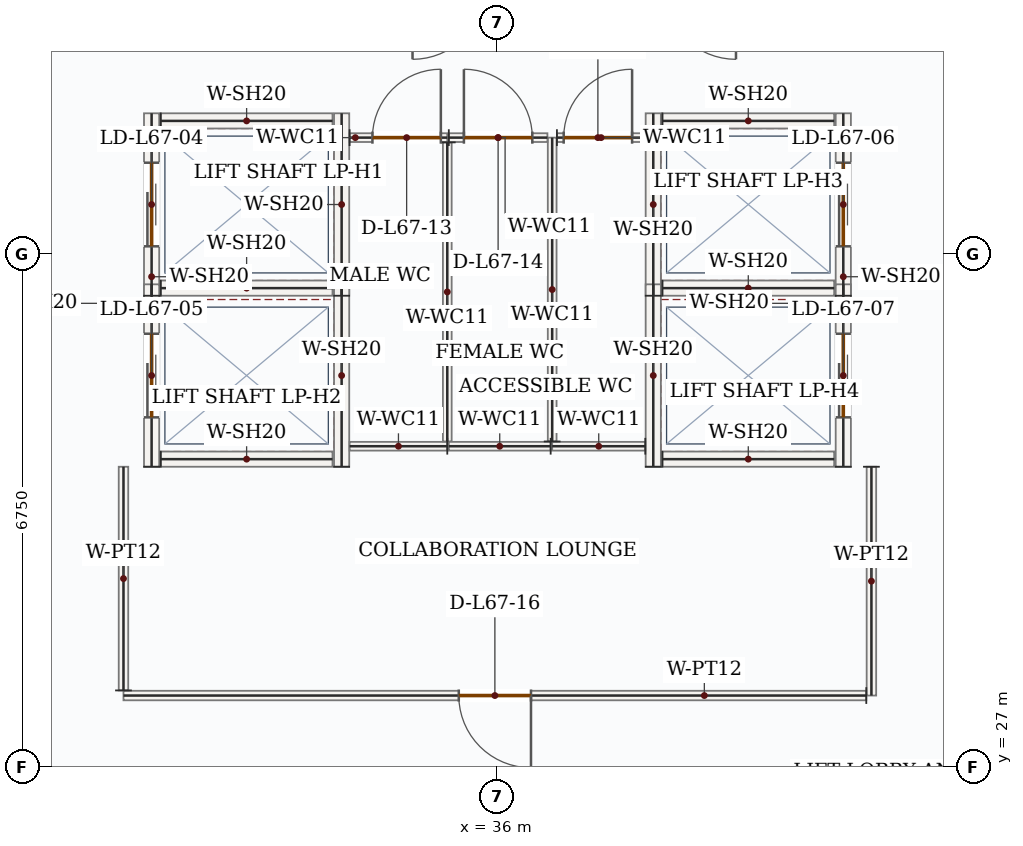
"""IFC4 building model, lengths in metres.
Left out: names, types, materials, properties, quantities, classifications, styles, units other than length and angle.
Written with IfcOpenShell. Run it as: python <this file> out.ifc"""

import sys

from ifc_helpers import new_model, si_unit, direction, frame, frame_2d, origin, place, context, subcontext, project, spatial, rectangle, extrude, source, transform, mapped, element, fill, save


model = new_model("IFC4")
c1 = context("Model", 3, precision=1e-05, world=origin(), true_north=direction((0.0, 1.0)))
c2 = subcontext(c1, "Body", "Model", "MODEL_VIEW")
j1 = project(units=[si_unit("LENGTHUNIT", "METRE"), si_unit("PLANEANGLEUNIT", "RADIAN")], contexts=[c1])
p1 = place(None, origin())
s1 = spatial("IfcSite", under=j1, at=p1, CompositionType="ELEMENT")
p2 = place(p1, origin())
s2 = spatial("IfcBuilding", under=s1, at=p2, CompositionType="ELEMENT")
p3 = place(p2, frame((0.0, 0.0, 280.35)))
s3 = spatial("IfcBuildingStorey", under=s2, at=p3, CompositionType="ELEMENT", Elevation=280.35)
p4 = place(p3, frame((31.45, 33.2, 0.0), z_axis=(0.0, 0.0, 1.0), x_axis=(0.0, 1.0, 0.0)))
e1 = element("IfcWall", 1, at=p4, inside=s3, PredefinedType="SOLIDWALL", context=c2, shape_type="SweptSolid", body=[
    extrude(rectangle(XDim=2.4, YDim=0.2, at=frame_2d((1.2, 0.0))), origin(), (0.0, 0.0, 1.0), 3.5),
])
p5 = place(p4, frame((0.65, 0.0, 0.0)))
e2 = element("IfcOpeningElement", 2, at=p5, cuts=e1, PredefinedType="OPENING", context=c2, shape_type="SweptSolid", body=[
    extrude(rectangle(XDim=1.1, YDim=2.15, at=frame_2d((0.55, 1.075))), frame((0.0, 0.11, 0.0), z_axis=(0.0, -1.0, 0.0), x_axis=(1.0, 0.0, 0.0)), (0.0, 0.0, 1.0), 0.22),
])
m1 = source(origin(), c2, "Body", "SweptSolid", [
    extrude(rectangle(XDim=2.4, YDim=0.2, at=frame_2d((1.2, 0.0))), origin(), (0.0, 0.0, 1.0), 3.5),
])
p6 = place(p3, frame((33.95, 33.2, 0.0), z_axis=(0.0, 0.0, 1.0), x_axis=(0.0, 1.0, 0.0)))
e3 = element("IfcWall", 3, at=p6, inside=s3, PredefinedType="SOLIDWALL", context=c2, shape_type="MappedRepresentation", body=[
    mapped(m1, transform((0.0, 0.0, 0.0), x_axis=(1.0, 0.0, 0.0), y_axis=(0.0, 1.0, 0.0), z_axis=(0.0, 0.0, 1.0), scale=1.0)),
])
m2 = source(origin(), c2, "Body", "SweptSolid", [
    extrude(rectangle(XDim=2.26, YDim=0.2, at=frame_2d((1.13, 0.0))), origin(), (0.0, 0.0, 1.0), 3.5),
])
for number, where, z_axis, x_axis in (
    (4, (31.57, 33.3, 0.0), (0.0, 0.0, 1.0), (1.0, 0.0, 0.0)),
    (5, (31.57, 35.5, 0.0), (0.0, 0.0, 1.0), (1.0, 0.0, 0.0)),
):
    element("IfcWall", number, at=place(p3, frame(where, z_axis=z_axis, x_axis=x_axis)), inside=s3, PredefinedType="SOLIDWALL", context=c2, shape_type="MappedRepresentation", body=[
        mapped(m2, transform((0.0, 0.0, 0.0), x_axis=(1.0, 0.0, 0.0), y_axis=(0.0, 1.0, 0.0), z_axis=(0.0, 0.0, 1.0), scale=1.0)),
    ])
p7 = place(p3, frame((31.45, 30.95, 0.0), z_axis=(0.0, 0.0, 1.0), x_axis=(0.0, 1.0, 0.0)))
e6 = element("IfcWall", 6, at=p7, inside=s3, PredefinedType="SOLIDWALL", context=c2, shape_type="SweptSolid", body=[
    extrude(rectangle(XDim=2.4, YDim=0.2, at=frame_2d((1.2, 0.0))), origin(), (0.0, 0.0, 1.0), 3.5),
])
p8 = place(p7, frame((0.65, 0.0, 0.0)))
e7 = element("IfcOpeningElement", 7, at=p8, cuts=e6, PredefinedType="OPENING", context=c2, shape_type="SweptSolid", body=[
    extrude(rectangle(XDim=1.1, YDim=2.15, at=frame_2d((0.55, 1.075))), frame((0.0, 0.11, 0.0), z_axis=(0.0, -1.0, 0.0), x_axis=(1.0, 0.0, 0.0)), (0.0, 0.0, 1.0), 0.22),
])
p9 = place(p3, frame((33.95, 30.95, 0.0), z_axis=(0.0, 0.0, 1.0), x_axis=(0.0, 1.0, 0.0)))
e8 = element("IfcWall", 8, at=p9, inside=s3, PredefinedType="SOLIDWALL", context=c2, shape_type="MappedRepresentation", body=[
    mapped(m1, transform((0.0, 0.0, 0.0), x_axis=(1.0, 0.0, 0.0), y_axis=(0.0, 1.0, 0.0), z_axis=(0.0, 0.0, 1.0), scale=1.0)),
])
p10 = place(p3, frame((31.57, 31.05, 0.0), z_axis=(0.0, 0.0, 1.0), x_axis=(1.0, 0.0, 0.0)))
e9 = element("IfcWall", 9, at=p10, inside=s3, PredefinedType="SOLIDWALL", context=c2, shape_type="MappedRepresentation", body=[
    mapped(m2, transform((0.0, 0.0, 0.0), x_axis=(1.0, 0.0, 0.0), y_axis=(0.0, 1.0, 0.0), z_axis=(0.0, 0.0, 1.0), scale=1.0)),
])
p11 = place(p3, frame((38.05, 33.2, 0.0), z_axis=(0.0, 0.0, 1.0), x_axis=(0.0, 1.0, 0.0)))
e10 = element("IfcWall", 10, at=p11, inside=s3, PredefinedType="SOLIDWALL", context=c2, shape_type="MappedRepresentation", body=[
    mapped(m1, transform((0.0, 0.0, 0.0), x_axis=(1.0, 0.0, 0.0), y_axis=(0.0, 1.0, 0.0), z_axis=(0.0, 0.0, 1.0), scale=1.0)),
])
p12 = place(p3, frame((40.55, 33.2, 0.0), z_axis=(0.0, 0.0, 1.0), x_axis=(0.0, 1.0, 0.0)))
e11 = element("IfcWall", 11, at=p12, inside=s3, PredefinedType="SOLIDWALL", context=c2, shape_type="SweptSolid", body=[
    extrude(rectangle(XDim=2.4, YDim=0.2, at=frame_2d((1.2, 0.0))), origin(), (0.0, 0.0, 1.0), 3.5),
])
p13 = place(p12, frame((0.65, 0.0, 0.0)))
e12 = element("IfcOpeningElement", 12, at=p13, cuts=e11, PredefinedType="OPENING", context=c2, shape_type="SweptSolid", body=[
    extrude(rectangle(XDim=1.1, YDim=2.15, at=frame_2d((0.55, 1.075))), frame((0.0, 0.11, 0.0), z_axis=(0.0, -1.0, 0.0), x_axis=(1.0, 0.0, 0.0)), (0.0, 0.0, 1.0), 0.22),
])
for number, where, z_axis, x_axis in (
    (13, (38.17, 33.3, 0.0), (0.0, 0.0, 1.0), (1.0, 0.0, 0.0)),
    (14, (38.17, 35.5, 0.0), (0.0, 0.0, 1.0), (1.0, 0.0, 0.0)),
):
    element("IfcWall", number, at=place(p3, frame(where, z_axis=z_axis, x_axis=x_axis)), inside=s3, PredefinedType="SOLIDWALL", context=c2, shape_type="MappedRepresentation", body=[
        mapped(m2, transform((0.0, 0.0, 0.0), x_axis=(1.0, 0.0, 0.0), y_axis=(0.0, 1.0, 0.0), z_axis=(0.0, 0.0, 1.0), scale=1.0)),
    ])
p14 = place(p3, frame((38.05, 30.95, 0.0), z_axis=(0.0, 0.0, 1.0), x_axis=(0.0, 1.0, 0.0)))
e15 = element("IfcWall", 15, at=p14, inside=s3, PredefinedType="SOLIDWALL", context=c2, shape_type="MappedRepresentation", body=[
    mapped(m1, transform((0.0, 0.0, 0.0), x_axis=(1.0, 0.0, 0.0), y_axis=(0.0, 1.0, 0.0), z_axis=(0.0, 0.0, 1.0), scale=1.0)),
])
p15 = place(p3, frame((40.55, 30.95, 0.0), z_axis=(0.0, 0.0, 1.0), x_axis=(0.0, 1.0, 0.0)))
e16 = element("IfcWall", 16, at=p15, inside=s3, PredefinedType="SOLIDWALL", context=c2, shape_type="SweptSolid", body=[
    extrude(rectangle(XDim=2.4, YDim=0.2, at=frame_2d((1.2, 0.0))), origin(), (0.0, 0.0, 1.0), 3.5),
])
p16 = place(p15, frame((0.65, 0.0, 0.0)))
e17 = element("IfcOpeningElement", 17, at=p16, cuts=e16, PredefinedType="OPENING", context=c2, shape_type="SweptSolid", body=[
    extrude(rectangle(XDim=1.1, YDim=2.15, at=frame_2d((0.55, 1.075))), frame((0.0, 0.11, 0.0), z_axis=(0.0, -1.0, 0.0), x_axis=(1.0, 0.0, 0.0)), (0.0, 0.0, 1.0), 0.22),
])
p17 = place(p3, frame((38.17, 31.05, 0.0), z_axis=(0.0, 0.0, 1.0), x_axis=(1.0, 0.0, 0.0)))
e18 = element("IfcWall", 18, at=p17, inside=s3, PredefinedType="SOLIDWALL", context=c2, shape_type="MappedRepresentation", body=[
    mapped(m2, transform((0.0, 0.0, 0.0), x_axis=(1.0, 0.0, 0.0), y_axis=(0.0, 1.0, 0.0), z_axis=(0.0, 0.0, 1.0), scale=1.0)),
])
m3 = source(origin(), c2, "Body", "SweptSolid", [
    extrude(rectangle(XDim=1.225, YDim=0.115, at=frame_2d((0.613, 0.0))), origin(), (0.0, 0.0, 1.0), 3.5),
])
p18 = place(p3, frame((37.945, 31.22, 0.0), z_axis=(0.0, 0.0, 1.0), x_axis=(-1.0, 0.0, 0.0)))
e19 = element("IfcWall", 19, at=p18, inside=s3, PredefinedType="PARTITIONING", context=c2, shape_type="MappedRepresentation", body=[
    mapped(m3, transform((0.0, 0.0, 0.0), x_axis=(1.0, 0.0, 0.0), y_axis=(0.0, 1.0, 0.0), z_axis=(0.0, 0.0, 1.0), scale=1.0)),
])
m4 = source(origin(), c2, "Body", "SweptSolid", [
    extrude(rectangle(XDim=3.998, YDim=0.115, at=frame_2d((1.999, 0.0))), origin(), (0.0, 0.0, 1.0), 3.5),
])
p19 = place(p3, frame((36.72, 31.282, 0.0), z_axis=(0.0, 0.0, 1.0), x_axis=(0.0, 1.0, 0.0)))
e20 = element("IfcWall", 20, at=p19, inside=s3, PredefinedType="PARTITIONING", context=c2, shape_type="MappedRepresentation", body=[
    mapped(m4, transform((0.0, 0.0, 0.0), x_axis=(1.0, 0.0, 0.0), y_axis=(0.0, 1.0, 0.0), z_axis=(0.0, 0.0, 1.0), scale=1.0)),
])
p20 = place(p3, frame((36.782, 35.28, 0.0), z_axis=(0.0, 0.0, 1.0), x_axis=(1.0, 0.0, 0.0)))
e21 = element("IfcWall", 21, at=p20, inside=s3, PredefinedType="PARTITIONING", context=c2, shape_type="SweptSolid", body=[
    extrude(rectangle(XDim=1.163, YDim=0.115, at=frame_2d((0.581, 0.0))), origin(), (0.0, 0.0, 1.0), 3.5),
])
p21 = place(p20, frame((0.089, 0.0, 0.0)))
e22 = element("IfcOpeningElement", 22, at=p21, cuts=e21, PredefinedType="OPENING", context=c2, shape_type="SweptSolid", body=[
    extrude(rectangle(XDim=0.9, YDim=2.1, at=frame_2d((0.45, 1.05))), frame((0.0, 0.067, 0.0), z_axis=(0.0, -1.0, 0.0), x_axis=(1.0, 0.0, 0.0)), (0.0, 0.0, 1.0), 0.135),
])
m5 = source(origin(), c2, "Body", "SweptSolid", [
    extrude(rectangle(XDim=1.285, YDim=0.115, at=frame_2d((0.643, 0.0))), origin(), (0.0, 0.0, 1.0), 3.5),
])
p22 = place(p3, frame((35.34, 31.22, 0.0), z_axis=(0.0, 0.0, 1.0), x_axis=(-1.0, 0.0, 0.0)))
e23 = element("IfcWall", 23, at=p22, inside=s3, PredefinedType="PARTITIONING", context=c2, shape_type="MappedRepresentation", body=[
    mapped(m5, transform((0.0, 0.0, 0.0), x_axis=(1.0, 0.0, 0.0), y_axis=(0.0, 1.0, 0.0), z_axis=(0.0, 0.0, 1.0), scale=1.0)),
])
p23 = place(p3, frame((34.055, 35.28, 0.0), z_axis=(0.0, 0.0, 1.0), x_axis=(1.0, 0.0, 0.0)))
e24 = element("IfcWall", 24, at=p23, inside=s3, PredefinedType="PARTITIONING", context=c2, shape_type="SweptSolid", body=[
    extrude(rectangle(XDim=1.285, YDim=0.115, at=frame_2d((0.643, 0.0))), origin(), (0.0, 0.0, 1.0), 3.5),
])
p24 = place(p23, frame((0.3, 0.0, 0.0)))
e25 = element("IfcOpeningElement", 25, at=p24, cuts=e24, PredefinedType="OPENING", context=c2, shape_type="SweptSolid", body=[
    extrude(rectangle(XDim=0.9, YDim=2.1, at=frame_2d((0.45, 1.05))), frame((0.0, 0.067, 0.0), z_axis=(0.0, -1.0, 0.0), x_axis=(1.0, 0.0, 0.0)), (0.0, 0.0, 1.0), 0.135),
])
m6 = source(origin(), c2, "Body", "SweptSolid", [
    extrude(rectangle(XDim=3.935, YDim=0.115, at=frame_2d((1.968, 0.0))), origin(), (0.0, 0.0, 1.0), 3.5),
])
p25 = place(p3, frame((35.34, 35.218, 0.0), z_axis=(0.0, 0.0, 1.0), x_axis=(0.0, -1.0, 0.0)))
e26 = element("IfcWall", 26, at=p25, inside=s3, PredefinedType="PARTITIONING", context=c2, shape_type="MappedRepresentation", body=[
    mapped(m6, transform((0.0, 0.0, 0.0), x_axis=(1.0, 0.0, 0.0), y_axis=(0.0, 1.0, 0.0), z_axis=(0.0, 0.0, 1.0), scale=1.0)),
])
m7 = source(origin(), c2, "Body", "SweptSolid", [
    extrude(rectangle(XDim=1.34, YDim=0.115, at=frame_2d((0.67, 0.0))), origin(), (0.0, 0.0, 1.0), 3.5),
])
p26 = place(p3, frame((36.7, 31.22, 0.0), z_axis=(0.0, 0.0, 1.0), x_axis=(-1.0, 0.0, 0.0)))
e27 = element("IfcWall", 27, at=p26, inside=s3, PredefinedType="PARTITIONING", context=c2, shape_type="MappedRepresentation", body=[
    mapped(m7, transform((0.0, 0.0, 0.0), x_axis=(1.0, 0.0, 0.0), y_axis=(0.0, 1.0, 0.0), z_axis=(0.0, 0.0, 1.0), scale=1.0)),
])
p27 = place(p3, frame((35.36, 35.28, 0.0), z_axis=(0.0, 0.0, 1.0), x_axis=(1.0, 0.0, 0.0)))
e28 = element("IfcWall", 28, at=p27, inside=s3, PredefinedType="PARTITIONING", context=c2, shape_type="SweptSolid", body=[
    extrude(rectangle(XDim=1.297, YDim=0.115, at=frame_2d((0.649, 0.0))), origin(), (0.0, 0.0, 1.0), 3.5),
])
p28 = place(p27, frame((0.199, 0.0, 0.0)))
e29 = element("IfcOpeningElement", 29, at=p28, cuts=e28, PredefinedType="OPENING", context=c2, shape_type="SweptSolid", body=[
    extrude(rectangle(XDim=0.9, YDim=2.1, at=frame_2d((0.45, 1.05))), frame((0.0, 0.067, 0.0), z_axis=(0.0, -1.0, 0.0), x_axis=(1.0, 0.0, 0.0)), (0.0, 0.0, 1.0), 0.135),
])
m8 = source(origin(), c2, "Body", "SweptSolid", [
    extrude(rectangle(XDim=3.01, YDim=0.125, at=frame_2d((1.505, 0.0))), origin(), (0.0, 0.0, 1.0), 3.5),
])
p29 = place(p3, frame((40.92, 30.95, 0.0), z_axis=(0.0, 0.0, 1.0), x_axis=(0.0, -1.0, 0.0)))
e30 = element("IfcWall", 30, at=p29, inside=s3, PredefinedType="PARTITIONING", context=c2, shape_type="MappedRepresentation", body=[
    mapped(m8, transform((0.0, 0.0, 0.0), x_axis=(1.0, 0.0, 0.0), y_axis=(0.0, 1.0, 0.0), z_axis=(0.0, 0.0, 1.0), scale=1.0)),
])
p30 = place(p3, frame((40.853, 27.94, 0.0), z_axis=(0.0, 0.0, 1.0), x_axis=(-1.0, 0.0, 0.0)))
e31 = element("IfcWall", 31, at=p30, inside=s3, PredefinedType="PARTITIONING", context=c2, shape_type="SweptSolid", body=[
    extrude(rectangle(XDim=9.772, YDim=0.125, at=frame_2d((4.886, 0.0))), origin(), (0.0, 0.0, 1.0), 3.5),
])
p31 = place(p30, frame((4.411, 0.0, 0.0)))
e32 = element("IfcOpeningElement", 32, at=p31, cuts=e31, PredefinedType="OPENING", context=c2, shape_type="SweptSolid", body=[
    extrude(rectangle(XDim=0.95, YDim=2.15, at=frame_2d((0.475, 1.075))), frame((0.0, 0.073, 0.0), z_axis=(0.0, -1.0, 0.0), x_axis=(1.0, 0.0, 0.0)), (0.0, 0.0, 1.0), 0.145),
])
m9 = source(origin(), c2, "Body", "SweptSolid", [
    extrude(rectangle(XDim=2.942, YDim=0.125, at=frame_2d((1.471, 0.0))), origin(), (0.0, 0.0, 1.0), 3.5),
])
p32 = place(p3, frame((31.08, 28.008, 0.0), z_axis=(0.0, 0.0, 1.0), x_axis=(0.0, 1.0, 0.0)))
e33 = element("IfcWall", 33, at=p32, inside=s3, PredefinedType="PARTITIONING", context=c2, shape_type="MappedRepresentation", body=[
    mapped(m9, transform((0.0, 0.0, 0.0), x_axis=(1.0, 0.0, 0.0), y_axis=(0.0, 1.0, 0.0), z_axis=(0.0, 0.0, 1.0), scale=1.0)),
])
m10 = source(origin(), c2, "Body", "SweptSolid", [
    extrude(rectangle(XDim=1.1, YDim=2.15, at=frame_2d((0.55, 1.075))), frame((0.0, 0.025, 0.0), z_axis=(0.0, -1.0, 0.0), x_axis=(1.0, 0.0, 0.0)), (0.0, 0.0, 1.0), 0.05),
])
p33 = place(p5, origin())
e34 = element("IfcDoor", 34, at=p33, inside=s3, OperationType="DOUBLE_DOOR_SLIDING", PredefinedType="DOOR", context=c2, shape_type="MappedRepresentation", body=[
    mapped(m10, transform((0.0, 0.0, 0.0), x_axis=(1.0, 0.0, 0.0), y_axis=(0.0, 1.0, 0.0), z_axis=(0.0, 0.0, 1.0), scale=1.0)),
])
fill(e2, e34)
p34 = place(p8, origin())
e35 = element("IfcDoor", 35, at=p34, inside=s3, OperationType="DOUBLE_DOOR_SLIDING", PredefinedType="DOOR", context=c2, shape_type="MappedRepresentation", body=[
    mapped(m10, transform((0.0, 0.0, 0.0), x_axis=(1.0, 0.0, 0.0), y_axis=(0.0, 1.0, 0.0), z_axis=(0.0, 0.0, 1.0), scale=1.0)),
])
fill(e7, e35)
p35 = place(p13, origin())
e36 = element("IfcDoor", 36, at=p35, inside=s3, OperationType="DOUBLE_DOOR_SLIDING", PredefinedType="DOOR", context=c2, shape_type="MappedRepresentation", body=[
    mapped(m10, transform((0.0, 0.0, 0.0), x_axis=(1.0, 0.0, 0.0), y_axis=(0.0, 1.0, 0.0), z_axis=(0.0, 0.0, 1.0), scale=1.0)),
])
fill(e12, e36)
p36 = place(p16, origin())
e37 = element("IfcDoor", 37, at=p36, inside=s3, OperationType="DOUBLE_DOOR_SLIDING", PredefinedType="DOOR", context=c2, shape_type="MappedRepresentation", body=[
    mapped(m10, transform((0.0, 0.0, 0.0), x_axis=(1.0, 0.0, 0.0), y_axis=(0.0, 1.0, 0.0), z_axis=(0.0, 0.0, 1.0), scale=1.0)),
])
fill(e17, e37)
m11 = source(origin(), c2, "Body", "SweptSolid", [
    extrude(rectangle(XDim=0.9, YDim=2.1, at=frame_2d((0.45, 1.05))), frame((0.0, 0.025, 0.0), z_axis=(0.0, -1.0, 0.0), x_axis=(1.0, 0.0, 0.0)), (0.0, 0.0, 1.0), 0.05),
])
p37 = place(p24, origin())
e38 = element("IfcDoor", 38, at=p37, inside=s3, OperationType="SINGLE_SWING_RIGHT", PredefinedType="DOOR", context=c2, shape_type="MappedRepresentation", body=[
    mapped(m11, transform((0.0, 0.0, 0.0), x_axis=(1.0, 0.0, 0.0), y_axis=(0.0, 1.0, 0.0), z_axis=(0.0, 0.0, 1.0), scale=1.0)),
])
fill(e25, e38)
p38 = place(p28, origin())
e39 = element("IfcDoor", 39, at=p38, inside=s3, OperationType="SINGLE_SWING_LEFT", PredefinedType="DOOR", context=c2, shape_type="MappedRepresentation", body=[
    mapped(m11, transform((0.0, 0.0, 0.0), x_axis=(1.0, 0.0, 0.0), y_axis=(0.0, 1.0, 0.0), z_axis=(0.0, 0.0, 1.0), scale=1.0)),
])
fill(e29, e39)
p39 = place(p21, origin())
e40 = element("IfcDoor", 40, at=p39, inside=s3, OperationType="SINGLE_SWING_RIGHT", PredefinedType="DOOR", context=c2, shape_type="MappedRepresentation", body=[
    mapped(m11, transform((0.0, 0.0, 0.0), x_axis=(1.0, 0.0, 0.0), y_axis=(0.0, 1.0, 0.0), z_axis=(0.0, 0.0, 1.0), scale=1.0)),
])
fill(e22, e40)
m12 = source(origin(), c2, "Body", "SweptSolid", [
    extrude(rectangle(XDim=0.95, YDim=2.15, at=frame_2d((0.475, 1.075))), frame((0.0, 0.025, 0.0), z_axis=(0.0, -1.0, 0.0), x_axis=(1.0, 0.0, 0.0)), (0.0, 0.0, 1.0), 0.05),
])
p40 = place(p31, origin())
e41 = element("IfcDoor", 41, at=p40, inside=s3, OperationType="SINGLE_SWING_LEFT", PredefinedType="DOOR", context=c2, shape_type="MappedRepresentation", body=[
    mapped(m12, transform((0.0, 0.0, 0.0), x_axis=(1.0, 0.0, 0.0), y_axis=(0.0, 1.0, 0.0), z_axis=(0.0, 0.0, 1.0), scale=1.0)),
])
fill(e32, e41)
save(model, sys.argv[1])
